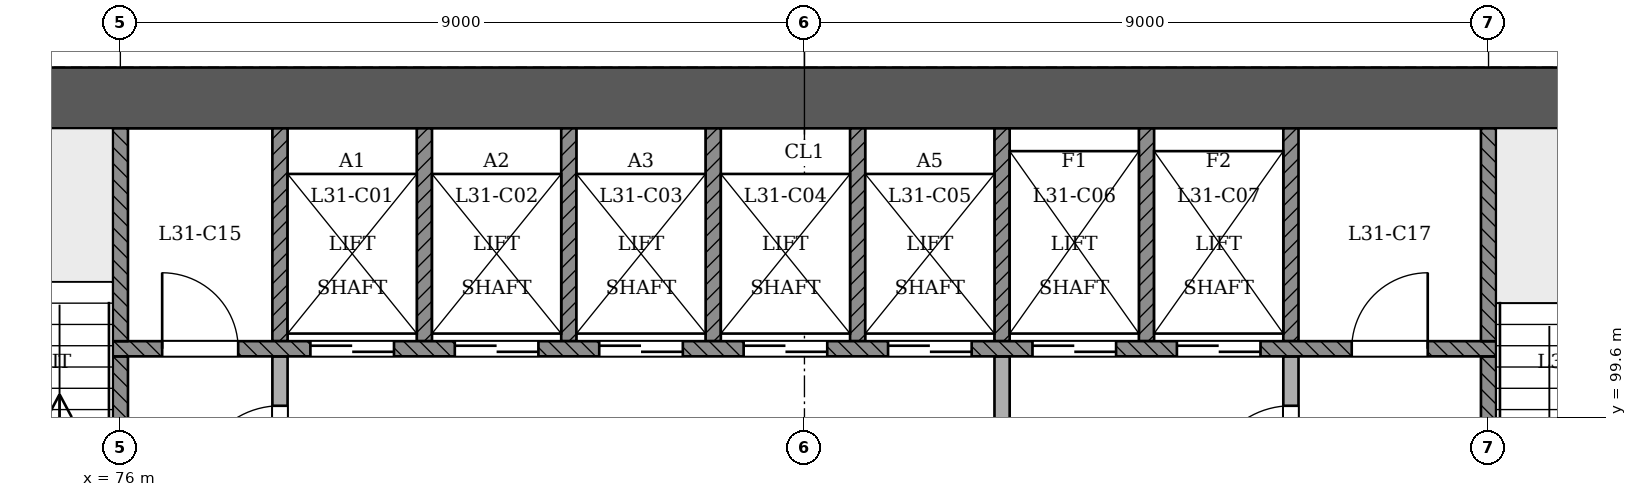
"""IFC4 building model, lengths in metres.
Left out: names, types, materials, properties, quantities, classifications, styles, units other than length and angle.
Written with IfcOpenShell. Run it as: python <this file> out.ifc"""

import sys

from ifc_helpers import new_model, si_unit, direction, frame, frame_2d, origin, place, context, subcontext, project, spatial, rectangle, extrude, element, fill, save


model = new_model("IFC4")
c1 = context("Model", 3, precision=1e-05, world=origin(), true_north=direction((0.0, 1.0)))
c2 = subcontext(c1, "Body", "Model", "MODEL_VIEW")
j1 = project(units=[si_unit("LENGTHUNIT", "METRE"), si_unit("PLANEANGLEUNIT", "RADIAN")], contexts=[c1])
p1 = place(None, origin())
s1 = spatial("IfcSite", under=j1, at=p1, CompositionType="ELEMENT")
p2 = place(p1, origin())
s2 = spatial("IfcBuilding", under=s1, at=p2, CompositionType="ELEMENT")
p3 = place(p2, frame((0.0, 0.0, 124.2)))
s3 = spatial("IfcBuildingStorey", under=s2, at=p3, CompositionType="ELEMENT", Elevation=124.2)
p4 = place(p3, frame((97.4, 103.8, 0.0), z_axis=(0.0, 0.0, 1.0), x_axis=(-1.0, 0.0, 0.0)))
e1 = element("IfcWall", 1, at=p4, inside=s3, PredefinedType="SHEAR", context=c2, shape_type="SweptSolid", body=[
    extrude(rectangle(XDim=25.2, YDim=0.8, at=frame_2d((12.6, 0.0))), origin(), (0.0, 0.0, 1.0), 3.6),
])
p5 = place(p3, frame((87.6, 93.4, 0.0), z_axis=(0.0, 0.0, 1.0), x_axis=(0.0, 1.0, 0.0)))
e2 = element("IfcWall", 2, at=p5, inside=s3, PredefinedType="PARTITIONING", context=c2, shape_type="SweptSolid", body=[
    extrude(rectangle(XDim=7.0, YDim=0.2, at=frame_2d((3.5, 0.0))), origin(), (0.0, 0.0, 1.0), 3.15),
])
p6 = place(p5, frame((4.45, 0.0, 0.0)))
e3 = element("IfcOpeningElement", 3, at=p6, cuts=e2, PredefinedType="OPENING", context=c2, shape_type="SweptSolid", body=[
    extrude(rectangle(XDim=1.1, YDim=2.1, at=frame_2d((0.55, 1.05))), frame((0.0, 0.11, 0.0), z_axis=(0.0, -1.0, 0.0), x_axis=(1.0, 0.0, 0.0)), (0.0, 0.0, 1.0), 0.221),
])
p7 = place(p3, frame((91.4, 96.2, 0.0), z_axis=(0.0, 0.0, 1.0), x_axis=(0.0, 1.0, 0.0)))
e4 = element("IfcWall", 4, at=p7, inside=s3, PredefinedType="PARTITIONING", context=c2, shape_type="SweptSolid", body=[
    extrude(rectangle(XDim=4.2, YDim=0.2, at=frame_2d((2.1, 0.0))), origin(), (0.0, 0.0, 1.0), 3.15),
])
p8 = place(p7, frame((2.45, 0.0, 0.0)))
e5 = element("IfcOpeningElement", 5, at=p8, cuts=e4, PredefinedType="OPENING", context=c2, shape_type="SweptSolid", body=[
    extrude(rectangle(XDim=1.1, YDim=2.1, at=frame_2d((0.55, 1.05))), frame((0.0, 0.11, 0.0), z_axis=(0.0, -1.0, 0.0), x_axis=(1.0, 0.0, 0.0)), (0.0, 0.0, 1.0), 0.221),
])
p9 = place(p3, frame((76.0, 96.7, 0.0), z_axis=(0.0, 0.0, 1.0), x_axis=(0.0, 1.0, 0.0)))
e6 = element("IfcWall", 6, at=p9, inside=s3, PredefinedType="SOLIDWALL", context=c2, shape_type="SweptSolid", body=[
    extrude(rectangle(XDim=3.7, YDim=0.2, at=frame_2d((1.85, 0.0))), origin(), (0.0, 0.0, 1.0), 3.15),
])
p10 = place(p9, frame((0.35, 0.0, 0.0)))
e7 = element("IfcOpeningElement", 7, at=p10, cuts=e6, PredefinedType="OPENING", context=c2, shape_type="SweptSolid", body=[
    extrude(rectangle(XDim=1.1, YDim=2.1, at=frame_2d((0.55, 1.05))), frame((0.0, 0.11, 0.0), z_axis=(0.0, -1.0, 0.0), x_axis=(1.0, 0.0, 0.0)), (0.0, 0.0, 1.0), 0.221),
])
p11 = place(p3, frame((78.1, 96.7, 0.0), z_axis=(0.0, 0.0, 1.0), x_axis=(0.0, 1.0, 0.0)))
e8 = element("IfcWall", 8, at=p11, inside=s3, PredefinedType="PARTITIONING", context=c2, shape_type="SweptSolid", body=[
    extrude(rectangle(XDim=3.7, YDim=0.2, at=frame_2d((1.85, 0.0))), origin(), (0.0, 0.0, 1.0), 3.15),
])
p12 = place(p11, frame((1.95, 0.0, 0.0)))
e9 = element("IfcOpeningElement", 9, at=p12, cuts=e8, PredefinedType="OPENING", context=c2, shape_type="SweptSolid", body=[
    extrude(rectangle(XDim=1.1, YDim=2.1, at=frame_2d((0.55, 1.05))), frame((0.0, 0.11, 0.0), z_axis=(0.0, -1.0, 0.0), x_axis=(1.0, 0.0, 0.0)), (0.0, 0.0, 1.0), 0.221),
])
p13 = place(p3, frame((94.0, 96.7, 0.0), z_axis=(0.0, 0.0, 1.0), x_axis=(0.0, 1.0, 0.0)))
e10 = element("IfcWall", 10, at=p13, inside=s3, PredefinedType="SOLIDWALL", context=c2, shape_type="SweptSolid", body=[
    extrude(rectangle(XDim=3.7, YDim=0.2, at=frame_2d((1.85, 0.0))), origin(), (0.0, 0.0, 1.0), 3.15),
])
p14 = place(p13, frame((0.35, 0.0, 0.0)))
e11 = element("IfcOpeningElement", 11, at=p14, cuts=e10, PredefinedType="OPENING", context=c2, shape_type="SweptSolid", body=[
    extrude(rectangle(XDim=1.1, YDim=2.1, at=frame_2d((0.55, 1.05))), frame((0.0, 0.11, 0.0), z_axis=(0.0, -1.0, 0.0), x_axis=(1.0, 0.0, 0.0)), (0.0, 0.0, 1.0), 0.221),
])
p15 = place(p3, frame((75.9, 100.5, 0.0), z_axis=(0.0, 0.0, 1.0), x_axis=(1.0, 0.0, 0.0)))
e12 = element("IfcWall", 12, at=p15, inside=s3, PredefinedType="SOLIDWALL", context=c2, shape_type="SweptSolid", body=[
    extrude(rectangle(XDim=18.2, YDim=0.2, at=frame_2d((9.1, 0.0))), origin(), (0.0, 0.0, 1.0), 3.15),
])
p16 = place(p15, frame((2.6, 0.0, 0.0)))
e13 = element("IfcOpeningElement", 13, at=p16, cuts=e12, PredefinedType="OPENING", context=c2, shape_type="SweptSolid", body=[
    extrude(rectangle(XDim=1.1, YDim=2.1, at=frame_2d((0.55, 1.05))), frame((0.0, 0.11, 0.0), z_axis=(0.0, -1.0, 0.0), x_axis=(1.0, 0.0, 0.0)), (0.0, 0.0, 1.0), 0.221),
])
p17 = place(p15, frame((4.5, 0.0, 0.0)))
e14 = element("IfcOpeningElement", 14, at=p17, cuts=e12, PredefinedType="OPENING", context=c2, shape_type="SweptSolid", body=[
    extrude(rectangle(XDim=1.1, YDim=2.1, at=frame_2d((0.55, 1.05))), frame((0.0, 0.11, 0.0), z_axis=(0.0, -1.0, 0.0), x_axis=(1.0, 0.0, 0.0)), (0.0, 0.0, 1.0), 0.221),
])
p18 = place(p15, frame((6.4, 0.0, 0.0)))
e15 = element("IfcOpeningElement", 15, at=p18, cuts=e12, PredefinedType="OPENING", context=c2, shape_type="SweptSolid", body=[
    extrude(rectangle(XDim=1.1, YDim=2.1, at=frame_2d((0.55, 1.05))), frame((0.0, 0.11, 0.0), z_axis=(0.0, -1.0, 0.0), x_axis=(1.0, 0.0, 0.0)), (0.0, 0.0, 1.0), 0.221),
])
p19 = place(p15, frame((8.3, 0.0, 0.0)))
e16 = element("IfcOpeningElement", 16, at=p19, cuts=e12, PredefinedType="OPENING", context=c2, shape_type="SweptSolid", body=[
    extrude(rectangle(XDim=1.1, YDim=2.1, at=frame_2d((0.55, 1.05))), frame((0.0, 0.11, 0.0), z_axis=(0.0, -1.0, 0.0), x_axis=(1.0, 0.0, 0.0)), (0.0, 0.0, 1.0), 0.221),
])
p20 = place(p15, frame((10.2, 0.0, 0.0)))
e17 = element("IfcOpeningElement", 17, at=p20, cuts=e12, PredefinedType="OPENING", context=c2, shape_type="SweptSolid", body=[
    extrude(rectangle(XDim=1.1, YDim=2.1, at=frame_2d((0.55, 1.05))), frame((0.0, 0.11, 0.0), z_axis=(0.0, -1.0, 0.0), x_axis=(1.0, 0.0, 0.0)), (0.0, 0.0, 1.0), 0.221),
])
p21 = place(p15, frame((12.1, 0.0, 0.0)))
e18 = element("IfcOpeningElement", 18, at=p21, cuts=e12, PredefinedType="OPENING", context=c2, shape_type="SweptSolid", body=[
    extrude(rectangle(XDim=1.1, YDim=2.1, at=frame_2d((0.55, 1.05))), frame((0.0, 0.11, 0.0), z_axis=(0.0, -1.0, 0.0), x_axis=(1.0, 0.0, 0.0)), (0.0, 0.0, 1.0), 0.221),
])
p22 = place(p15, frame((14.0, 0.0, 0.0)))
e19 = element("IfcOpeningElement", 19, at=p22, cuts=e12, PredefinedType="OPENING", context=c2, shape_type="SweptSolid", body=[
    extrude(rectangle(XDim=1.1, YDim=2.1, at=frame_2d((0.55, 1.05))), frame((0.0, 0.11, 0.0), z_axis=(0.0, -1.0, 0.0), x_axis=(1.0, 0.0, 0.0)), (0.0, 0.0, 1.0), 0.221),
])
p23 = place(p15, frame((0.65, 0.0, 0.0)))
e20 = element("IfcOpeningElement", 20, at=p23, cuts=e12, PredefinedType="OPENING", context=c2, shape_type="SweptSolid", body=[
    extrude(rectangle(XDim=1.0, YDim=2.1, at=frame_2d((0.5, 1.05))), frame((0.0, 0.11, 0.0), z_axis=(0.0, -1.0, 0.0), x_axis=(1.0, 0.0, 0.0)), (0.0, 0.0, 1.0), 0.221),
])
p24 = place(p15, frame((16.3, 0.0, 0.0)))
e21 = element("IfcOpeningElement", 21, at=p24, cuts=e12, PredefinedType="OPENING", context=c2, shape_type="SweptSolid", body=[
    extrude(rectangle(XDim=1.0, YDim=2.1, at=frame_2d((0.5, 1.05))), frame((0.0, 0.11, 0.0), z_axis=(0.0, -1.0, 0.0), x_axis=(1.0, 0.0, 0.0)), (0.0, 0.0, 1.0), 0.221),
])
for number, where, z_axis, x_axis in (
    (22, (76.0, 100.6, 0.0), (0.0, 0.0, 1.0), (0.0, 1.0, 0.0)),
    (23, (78.1, 100.6, 0.0), (0.0, 0.0, 1.0), (0.0, 1.0, 0.0)),
    (24, (80.0, 100.6, 0.0), (0.0, 0.0, 1.0), (0.0, 1.0, 0.0)),
    (25, (81.9, 100.6, 0.0), (0.0, 0.0, 1.0), (0.0, 1.0, 0.0)),
    (26, (83.8, 100.6, 0.0), (0.0, 0.0, 1.0), (0.0, 1.0, 0.0)),
    (27, (85.7, 100.6, 0.0), (0.0, 0.0, 1.0), (0.0, 1.0, 0.0)),
    (28, (87.6, 100.6, 0.0), (0.0, 0.0, 1.0), (0.0, 1.0, 0.0)),
    (29, (89.5, 100.6, 0.0), (0.0, 0.0, 1.0), (0.0, 1.0, 0.0)),
    (30, (91.4, 100.6, 0.0), (0.0, 0.0, 1.0), (0.0, 1.0, 0.0)),
    (31, (94.0, 100.6, 0.0), (0.0, 0.0, 1.0), (0.0, 1.0, 0.0)),
):
    element("IfcWall", number, at=place(p3, frame(where, z_axis=z_axis, x_axis=x_axis)), inside=s3, PredefinedType="SOLIDWALL", context=c2, shape_type="SweptSolid", body=[
        extrude(rectangle(XDim=2.8, YDim=0.2, at=frame_2d((1.4, 0.0))), origin(), (0.0, 0.0, 1.0), 3.15),
    ])
p25 = place(p16, origin())
e32 = element("IfcDoor", 32, at=p25, inside=s3, OperationType="SLIDING_TO_RIGHT", PredefinedType="NOTDEFINED", context=c2, shape_type="SweptSolid", body=[
    extrude(rectangle(XDim=1.1, YDim=2.1, at=frame_2d((0.55, 1.05))), frame((0.0, 0.025, 0.0), z_axis=(0.0, -1.0, 0.0), x_axis=(1.0, 0.0, 0.0)), (0.0, 0.0, 1.0), 0.05),
])
fill(e13, e32)
p26 = place(p17, origin())
e33 = element("IfcDoor", 33, at=p26, inside=s3, OperationType="SLIDING_TO_LEFT", PredefinedType="NOTDEFINED", context=c2, shape_type="SweptSolid", body=[
    extrude(rectangle(XDim=1.1, YDim=2.1, at=frame_2d((0.55, 1.05))), frame((0.0, 0.025, 0.0), z_axis=(0.0, -1.0, 0.0), x_axis=(1.0, 0.0, 0.0)), (0.0, 0.0, 1.0), 0.05),
])
fill(e14, e33)
p27 = place(p18, origin())
e34 = element("IfcDoor", 34, at=p27, inside=s3, OperationType="SLIDING_TO_RIGHT", PredefinedType="NOTDEFINED", context=c2, shape_type="SweptSolid", body=[
    extrude(rectangle(XDim=1.1, YDim=2.1, at=frame_2d((0.55, 1.05))), frame((0.0, 0.025, 0.0), z_axis=(0.0, -1.0, 0.0), x_axis=(1.0, 0.0, 0.0)), (0.0, 0.0, 1.0), 0.05),
])
fill(e15, e34)
p28 = place(p19, origin())
e35 = element("IfcDoor", 35, at=p28, inside=s3, OperationType="SLIDING_TO_LEFT", PredefinedType="NOTDEFINED", context=c2, shape_type="SweptSolid", body=[
    extrude(rectangle(XDim=1.1, YDim=2.1, at=frame_2d((0.55, 1.05))), frame((0.0, 0.025, 0.0), z_axis=(0.0, -1.0, 0.0), x_axis=(1.0, 0.0, 0.0)), (0.0, 0.0, 1.0), 0.05),
])
fill(e16, e35)
p29 = place(p20, origin())
e36 = element("IfcDoor", 36, at=p29, inside=s3, OperationType="SLIDING_TO_RIGHT", PredefinedType="NOTDEFINED", context=c2, shape_type="SweptSolid", body=[
    extrude(rectangle(XDim=1.1, YDim=2.1, at=frame_2d((0.55, 1.05))), frame((0.0, 0.025, 0.0), z_axis=(0.0, -1.0, 0.0), x_axis=(1.0, 0.0, 0.0)), (0.0, 0.0, 1.0), 0.05),
])
fill(e17, e36)
p30 = place(p21, origin())
e37 = element("IfcDoor", 37, at=p30, inside=s3, OperationType="SLIDING_TO_RIGHT", PredefinedType="NOTDEFINED", context=c2, shape_type="SweptSolid", body=[
    extrude(rectangle(XDim=1.1, YDim=2.1, at=frame_2d((0.55, 1.05))), frame((0.0, 0.025, 0.0), z_axis=(0.0, -1.0, 0.0), x_axis=(1.0, 0.0, 0.0)), (0.0, 0.0, 1.0), 0.05),
])
fill(e18, e37)
p31 = place(p22, origin())
e38 = element("IfcDoor", 38, at=p31, inside=s3, OperationType="SLIDING_TO_LEFT", PredefinedType="NOTDEFINED", context=c2, shape_type="SweptSolid", body=[
    extrude(rectangle(XDim=1.1, YDim=2.1, at=frame_2d((0.55, 1.05))), frame((0.0, 0.025, 0.0), z_axis=(0.0, -1.0, 0.0), x_axis=(1.0, 0.0, 0.0)), (0.0, 0.0, 1.0), 0.05),
])
fill(e19, e38)
p32 = place(p12, origin())
e39 = element("IfcDoor", 39, at=p32, inside=s3, OperationType="SINGLE_SWING_LEFT", PredefinedType="NOTDEFINED", context=c2, shape_type="SweptSolid", body=[
    extrude(rectangle(XDim=1.1, YDim=2.1, at=frame_2d((0.55, 1.05))), frame((0.0, 0.025, 0.0), z_axis=(0.0, -1.0, 0.0), x_axis=(1.0, 0.0, 0.0)), (0.0, 0.0, 1.0), 0.05),
])
fill(e9, e39)
p33 = place(p8, origin())
e40 = element("IfcDoor", 40, at=p33, inside=s3, OperationType="SINGLE_SWING_LEFT", PredefinedType="NOTDEFINED", context=c2, shape_type="SweptSolid", body=[
    extrude(rectangle(XDim=1.1, YDim=2.1, at=frame_2d((0.55, 1.05))), frame((0.0, 0.025, 0.0), z_axis=(0.0, -1.0, 0.0), x_axis=(1.0, 0.0, 0.0)), (0.0, 0.0, 1.0), 0.05),
])
fill(e5, e40)
p34 = place(p23, origin())
e41 = element("IfcDoor", 41, at=p34, inside=s3, OperationType="SINGLE_SWING_LEFT", PredefinedType="NOTDEFINED", context=c2, shape_type="SweptSolid", body=[
    extrude(rectangle(XDim=1.0, YDim=2.1, at=frame_2d((0.5, 1.05))), frame((0.0, 0.025, 0.0), z_axis=(0.0, -1.0, 0.0), x_axis=(1.0, 0.0, 0.0)), (0.0, 0.0, 1.0), 0.05),
])
fill(e20, e41)
p35 = place(p24, origin())
e42 = element("IfcDoor", 42, at=p35, inside=s3, OperationType="SINGLE_SWING_RIGHT", PredefinedType="NOTDEFINED", context=c2, shape_type="SweptSolid", body=[
    extrude(rectangle(XDim=1.0, YDim=2.1, at=frame_2d((0.5, 1.05))), frame((0.0, 0.025, 0.0), z_axis=(0.0, -1.0, 0.0), x_axis=(1.0, 0.0, 0.0)), (0.0, 0.0, 1.0), 0.05),
])
fill(e21, e42)
save(model, sys.argv[1])
